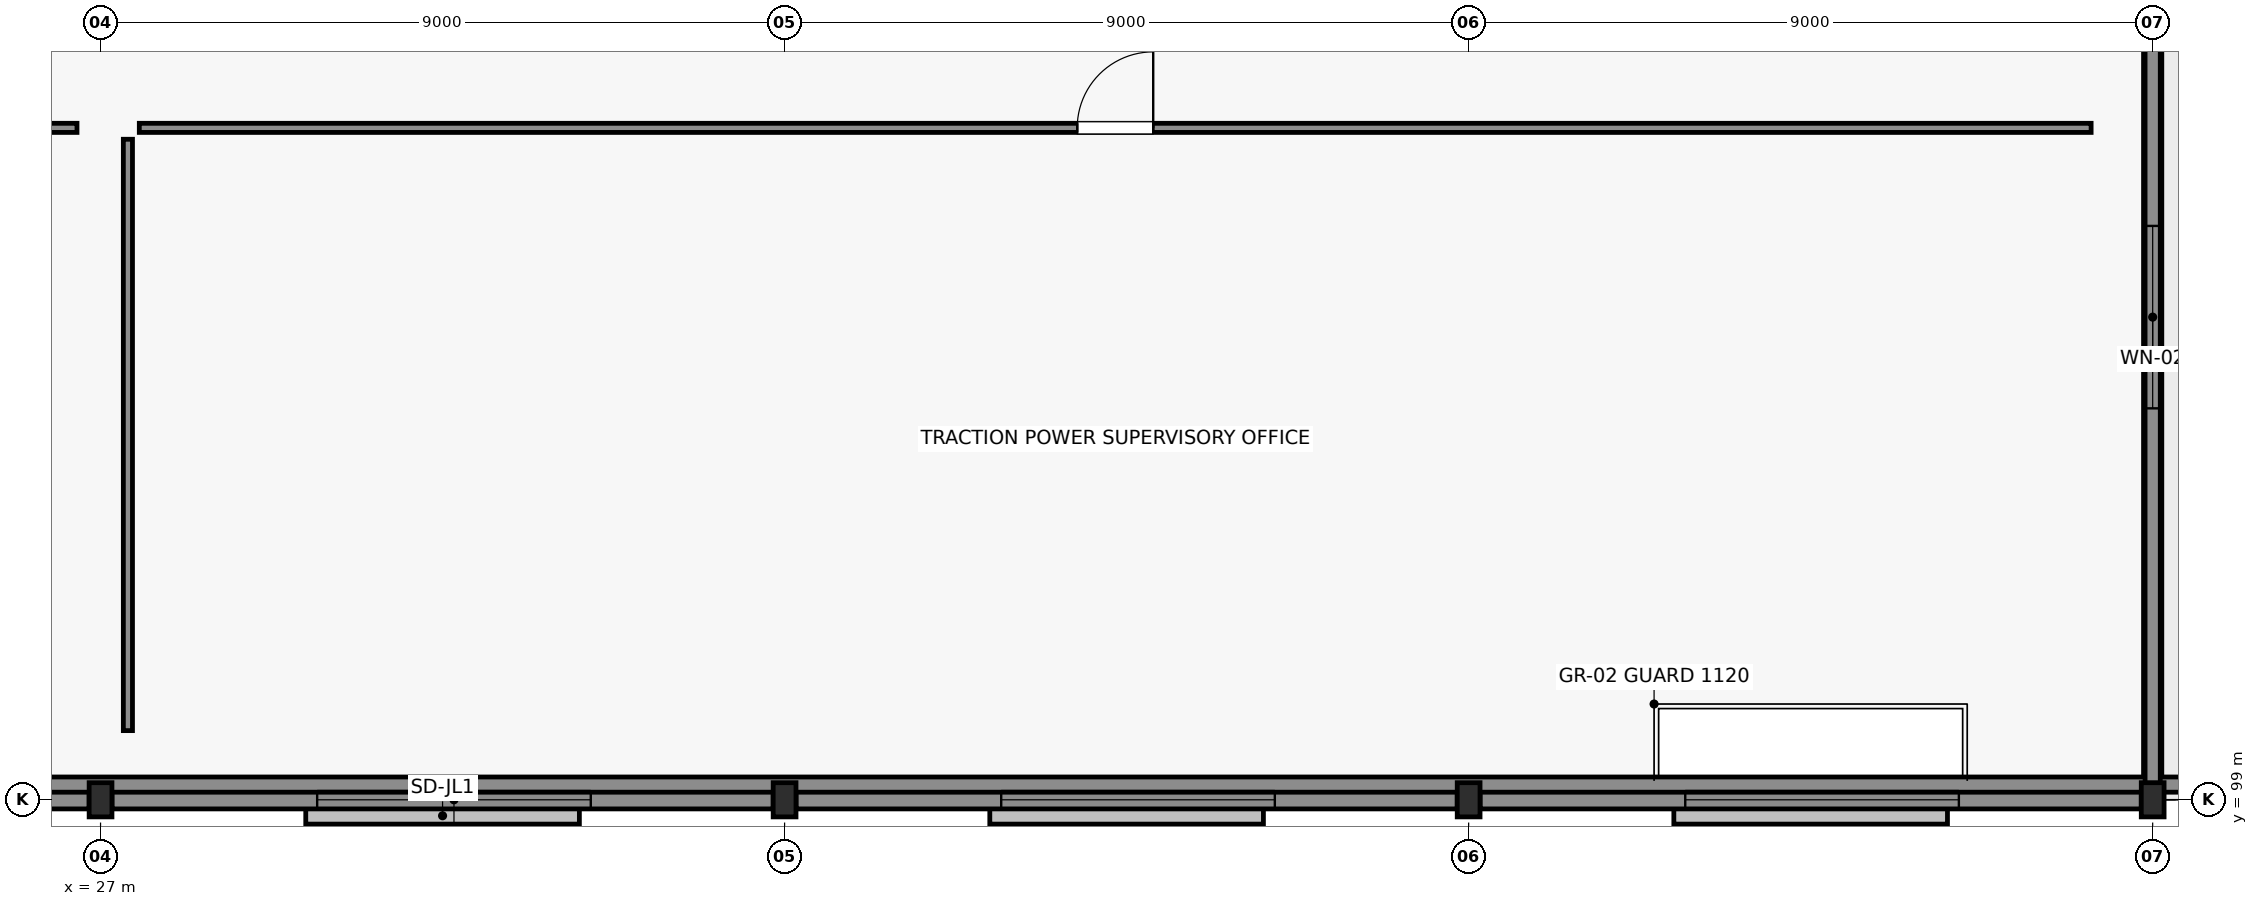
"""IFC4 building model, lengths in metres.
Left out: names, types, materials, properties, quantities, classifications, styles, units other than length and angle.
Written with IfcOpenShell. Run it as: python <this file> out.ifc"""

import sys

from ifc_helpers import new_model, si_unit, direction, frame, frame_2d, origin, origin_2d, place, context, subcontext, project, spatial, rectangle, i_section, extrude, element, fill, save


model = new_model("IFC4")
c1 = context("Model", 3, precision=1e-05, world=origin(), true_north=direction((0.0, 1.0)))
c2 = subcontext(c1, "Body", "Model", "MODEL_VIEW")
j1 = project(units=[si_unit("LENGTHUNIT", "METRE"), si_unit("PLANEANGLEUNIT", "RADIAN")], contexts=[c1])
p1 = place(None, origin())
s1 = spatial("IfcSite", under=j1, at=p1, CompositionType="ELEMENT")
p2 = place(p1, origin())
s2 = spatial("IfcBuilding", under=s1, at=p2, CompositionType="ELEMENT")
p3 = place(p2, frame((0.0, 0.0, 24.0)))
s3 = spatial("IfcBuildingStorey", under=s2, at=p3, CompositionType="ELEMENT", Elevation=24.0)
for number, where, z_axis, x_axis in (
    (1, (27.0, 99.0, 0.0), (0.0, 0.0, 1.0), (1.0, 0.0, 0.0)),
    (2, (36.0, 99.0, 0.0), (0.0, 0.0, 1.0), (1.0, 0.0, 0.0)),
    (3, (45.0, 99.0, 0.0), (0.0, 0.0, 1.0), (1.0, 0.0, 0.0)),
    (4, (54.0, 99.0, 0.0), (0.0, 0.0, 1.0), (1.0, 0.0, 0.0)),
):
    element("IfcColumn", number, at=place(p3, frame(where, z_axis=z_axis, x_axis=x_axis)), inside=s3, PredefinedType="COLUMN", context=c2, shape_type="SweptSolid", body=[
        extrude(i_section(OverallWidth=0.3, OverallDepth=0.45, WebThickness=0.014, FlangeThickness=0.026, FilletRadius=0.027, at=origin_2d()), origin(), (0.0, 0.0, 1.0), 3.98),
    ])
p4 = place(p3, frame((26.85, 99.0, 0.0), z_axis=(0.0, 0.0, 1.0), x_axis=(-1.0, 0.0, 0.0)))
e5 = element("IfcWall", 5, at=p4, inside=s3, PredefinedType="SOLIDWALL", context=c2, shape_type="SweptSolid", body=[
    extrude(rectangle(XDim=8.7, YDim=0.24, at=frame_2d((4.35, 0.0))), origin(), (0.0, 0.0, 1.0), 3.55),
])
p5 = place(p4, frame((1.8, 0.0, 1.05)))
e6 = element("IfcOpeningElement", 6, at=p5, cuts=e5, PredefinedType="OPENING", context=c2, shape_type="SweptSolid", body=[
    extrude(rectangle(XDim=2.7, YDim=1.8, at=frame_2d((1.35, 0.9))), frame((0.0, 0.13, 0.0), z_axis=(0.0, -1.0, 0.0), x_axis=(1.0, 0.0, 0.0)), (0.0, 0.0, 1.0), 0.26),
])
p6 = place(p4, frame((5.2, 0.0, 1.05)))
e7 = element("IfcOpeningElement", 7, at=p6, cuts=e5, PredefinedType="OPENING", context=c2, shape_type="SweptSolid", body=[
    extrude(rectangle(XDim=2.7, YDim=1.8, at=frame_2d((1.35, 0.9))), frame((0.0, 0.13, 0.0), z_axis=(0.0, -1.0, 0.0), x_axis=(1.0, 0.0, 0.0)), (0.0, 0.0, 1.0), 0.26),
])
p7 = place(p3, frame((35.85, 99.0, 0.0), z_axis=(0.0, 0.0, 1.0), x_axis=(-1.0, 0.0, 0.0)))
e8 = element("IfcWall", 8, at=p7, inside=s3, PredefinedType="SOLIDWALL", context=c2, shape_type="SweptSolid", body=[
    extrude(rectangle(XDim=8.7, YDim=0.24, at=frame_2d((4.35, 0.0))), origin(), (0.0, 0.0, 1.0), 3.55),
])
p8 = place(p7, frame((2.4, 0.0, 1.2)))
e9 = element("IfcOpeningElement", 9, at=p8, cuts=e8, PredefinedType="OPENING", context=c2, shape_type="SweptSolid", body=[
    extrude(rectangle(XDim=3.6, YDim=1.5, at=frame_2d((1.8, 0.75))), frame((0.0, 0.13, 0.0), z_axis=(0.0, -1.0, 0.0), x_axis=(1.0, 0.0, 0.0)), (0.0, 0.0, 1.0), 0.26),
])
p9 = place(p3, frame((44.85, 99.0, 0.0), z_axis=(0.0, 0.0, 1.0), x_axis=(-1.0, 0.0, 0.0)))
e10 = element("IfcWall", 10, at=p9, inside=s3, PredefinedType="SOLIDWALL", context=c2, shape_type="SweptSolid", body=[
    extrude(rectangle(XDim=8.7, YDim=0.24, at=frame_2d((4.35, 0.0))), origin(), (0.0, 0.0, 1.0), 3.55),
])
p10 = place(p9, frame((2.4, 0.0, 1.2)))
e11 = element("IfcOpeningElement", 11, at=p10, cuts=e10, PredefinedType="OPENING", context=c2, shape_type="SweptSolid", body=[
    extrude(rectangle(XDim=3.6, YDim=1.5, at=frame_2d((1.8, 0.75))), frame((0.0, 0.13, 0.0), z_axis=(0.0, -1.0, 0.0), x_axis=(1.0, 0.0, 0.0)), (0.0, 0.0, 1.0), 0.26),
])
p11 = place(p3, frame((53.85, 99.0, 0.0), z_axis=(0.0, 0.0, 1.0), x_axis=(-1.0, 0.0, 0.0)))
e12 = element("IfcWall", 12, at=p11, inside=s3, PredefinedType="SOLIDWALL", context=c2, shape_type="SweptSolid", body=[
    extrude(rectangle(XDim=8.7, YDim=0.24, at=frame_2d((4.35, 0.0))), origin(), (0.0, 0.0, 1.0), 3.55),
])
p12 = place(p11, frame((2.4, 0.0, 1.2)))
e13 = element("IfcOpeningElement", 13, at=p12, cuts=e12, PredefinedType="OPENING", context=c2, shape_type="SweptSolid", body=[
    extrude(rectangle(XDim=3.6, YDim=1.5, at=frame_2d((1.8, 0.75))), frame((0.0, 0.13, 0.0), z_axis=(0.0, -1.0, 0.0), x_axis=(1.0, 0.0, 0.0)), (0.0, 0.0, 1.0), 0.26),
])
p13 = place(p3, frame((54.0, 110.275, 0.0), z_axis=(0.0, 0.0, 1.0), x_axis=(0.0, -1.0, 0.0)))
e14 = element("IfcWall", 14, at=p13, inside=s3, PredefinedType="SOLIDWALL", context=c2, shape_type="SweptSolid", body=[
    extrude(rectangle(XDim=11.05, YDim=0.24, at=frame_2d((5.525, 0.0))), origin(), (0.0, 0.0, 1.0), 3.55),
])
p14 = place(p13, frame((3.725, 0.0, 1.1)))
e15 = element("IfcOpeningElement", 15, at=p14, cuts=e14, PredefinedType="OPENING", context=c2, shape_type="SweptSolid", body=[
    extrude(rectangle(XDim=2.4, YDim=1.6, at=frame_2d((1.2, 0.8))), frame((0.0, 0.13, 0.0), z_axis=(0.0, -1.0, 0.0), x_axis=(1.0, 0.0, 0.0)), (0.0, 0.0, 1.0), 0.26),
])
p15 = place(p3, frame((63.0, 99.2, 0.0), z_axis=(0.0, 0.0, 1.0), x_axis=(-1.0, 0.0, 0.0)))
e16 = element("IfcWall", 16, at=p15, inside=s3, PredefinedType="PARAPET", context=c2, shape_type="SweptSolid", body=[
    extrude(rectangle(XDim=9.0, YDim=0.2, at=frame_2d((4.5, 0.0))), origin(), (0.0, 0.0, 1.0), 1.15),
])
p16 = place(p3, frame((54.0, 99.2, 4.2), z_axis=(0.0, 0.0, 1.0), x_axis=(-1.0, 0.0, 0.0)))
e17 = element("IfcWall", 17, at=p16, inside=s3, PredefinedType="PARAPET", context=c2, shape_type="SweptSolid", body=[
    extrude(rectangle(XDim=54.0, YDim=0.2, at=frame_2d((27.0, 0.0))), origin(), (0.0, 0.0, 1.0), 1.15),
])
p17 = place(p3, frame((54.0, 131.8, 4.2), z_axis=(0.0, 0.0, 1.0), x_axis=(0.0, -1.0, 0.0)))
e18 = element("IfcWall", 18, at=p17, inside=s3, PredefinedType="PARAPET", context=c2, shape_type="SweptSolid", body=[
    extrude(rectangle(XDim=32.6, YDim=0.2, at=frame_2d((16.3, 0.0))), origin(), (0.0, 0.0, 1.0), 1.15),
])
p18 = place(p3, frame((0.81, 107.84, 0.0), z_axis=(0.0, 0.0, 1.0), x_axis=(1.0, 0.0, 0.0)))
e19 = element("IfcWall", 19, at=p18, inside=s3, PredefinedType="PARTITIONING", context=c2, shape_type="SweptSolid", body=[
    extrude(rectangle(XDim=25.88, YDim=0.12, at=frame_2d((12.94, 0.0))), origin(), (0.0, 0.0, 1.0), 3.5),
])
p19 = place(p18, frame((12.44, 0.0, 0.0)))
e20 = element("IfcOpeningElement", 20, at=p19, cuts=e19, PredefinedType="OPENING", context=c2, shape_type="SweptSolid", body=[
    extrude(rectangle(XDim=1.0, YDim=2.15, at=frame_2d((0.5, 1.075))), frame((0.0, 0.07, 0.0), z_axis=(0.0, -1.0, 0.0), x_axis=(1.0, 0.0, 0.0)), (0.0, 0.0, 1.0), 0.14),
])
p20 = place(p3, frame((27.51, 107.84, 0.0), z_axis=(0.0, 0.0, 1.0), x_axis=(1.0, 0.0, 0.0)))
e21 = element("IfcWall", 21, at=p20, inside=s3, PredefinedType="PARTITIONING", context=c2, shape_type="SweptSolid", body=[
    extrude(rectangle(XDim=25.68, YDim=0.12, at=frame_2d((12.84, 0.0))), origin(), (0.0, 0.0, 1.0), 3.5),
])
p21 = place(p20, frame((12.34, 0.0, 0.0)))
e22 = element("IfcOpeningElement", 22, at=p21, cuts=e21, PredefinedType="OPENING", context=c2, shape_type="SweptSolid", body=[
    extrude(rectangle(XDim=1.0, YDim=2.15, at=frame_2d((0.5, 1.075))), frame((0.0, 0.07, 0.0), z_axis=(0.0, -1.0, 0.0), x_axis=(1.0, 0.0, 0.0)), (0.0, 0.0, 1.0), 0.14),
])
p22 = place(p3, frame((27.36, 99.91, 0.0), z_axis=(0.0, 0.0, 1.0), x_axis=(0.0, 1.0, 0.0)))
e23 = element("IfcWall", 23, at=p22, inside=s3, PredefinedType="PARTITIONING", context=c2, shape_type="SweptSolid", body=[
    extrude(rectangle(XDim=7.78, YDim=0.12, at=frame_2d((3.89, 0.0))), origin(), (0.0, 0.0, 1.0), 3.95),
])
p23 = place(p8, origin())
e24 = element("IfcWindow", 24, at=p23, inside=s3, PartitioningType="SINGLE_PANEL", PredefinedType="WINDOW", context=c2, shape_type="SweptSolid", body=[
    extrude(rectangle(XDim=3.6, YDim=1.5, at=frame_2d((1.8, 0.75))), frame((0.0, 0.03, 0.0), z_axis=(0.0, -1.0, 0.0), x_axis=(1.0, 0.0, 0.0)), (0.0, 0.0, 1.0), 0.06),
])
fill(e9, e24)
p24 = place(p10, origin())
e25 = element("IfcWindow", 25, at=p24, inside=s3, PartitioningType="SINGLE_PANEL", PredefinedType="WINDOW", context=c2, shape_type="SweptSolid", body=[
    extrude(rectangle(XDim=3.6, YDim=1.5, at=frame_2d((1.8, 0.75))), frame((0.0, 0.03, 0.0), z_axis=(0.0, -1.0, 0.0), x_axis=(1.0, 0.0, 0.0)), (0.0, 0.0, 1.0), 0.06),
])
fill(e11, e25)
p25 = place(p12, origin())
e26 = element("IfcWindow", 26, at=p25, inside=s3, PartitioningType="SINGLE_PANEL", PredefinedType="WINDOW", context=c2, shape_type="SweptSolid", body=[
    extrude(rectangle(XDim=3.6, YDim=1.5, at=frame_2d((1.8, 0.75))), frame((0.0, 0.03, 0.0), z_axis=(0.0, -1.0, 0.0), x_axis=(1.0, 0.0, 0.0)), (0.0, 0.0, 1.0), 0.06),
])
fill(e13, e26)
p26 = place(p14, origin())
e27 = element("IfcWindow", 27, at=p26, inside=s3, PartitioningType="SINGLE_PANEL", PredefinedType="WINDOW", context=c2, shape_type="SweptSolid", body=[
    extrude(rectangle(XDim=2.4, YDim=1.6, at=frame_2d((1.2, 0.8))), frame((0.0, 0.03, 0.0), z_axis=(0.0, -1.0, 0.0), x_axis=(1.0, 0.0, 0.0)), (0.0, 0.0, 1.0), 0.06),
])
fill(e15, e27)
p27 = place(p21, origin())
e28 = element("IfcDoor", 28, at=p27, inside=s3, OperationType="SINGLE_SWING_RIGHT", PredefinedType="DOOR", context=c2, shape_type="SweptSolid", body=[
    extrude(rectangle(XDim=1.0, YDim=2.15, at=frame_2d((0.5, 1.075))), frame((0.0, 0.025, 0.0), z_axis=(0.0, -1.0, 0.0), x_axis=(1.0, 0.0, 0.0)), (0.0, 0.0, 1.0), 0.05),
])
fill(e22, e28)
save(model, sys.argv[1])
